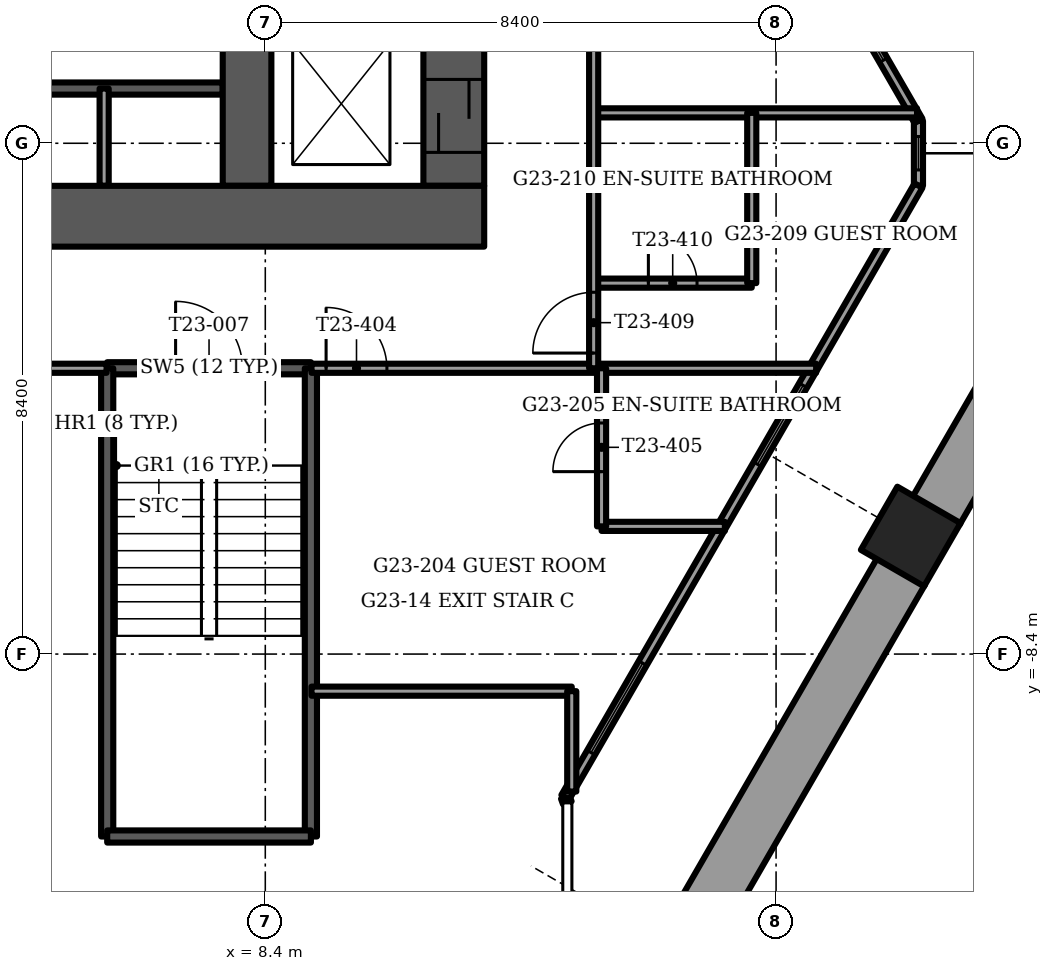
"""IFC4 building model, lengths in metres.
Left out: names, types, materials, properties, quantities, classifications, styles, units other than length and angle.
Written with IfcOpenShell. Run it as: python <this file> out.ifc"""

import sys

from ifc_helpers import new_model, si_unit, direction, frame, frame_2d, origin, origin_2d, place, context, subcontext, project, spatial, rectangle, extrude, element, fill, save


model = new_model("IFC4")
c1 = context("Model", 3, precision=1e-05, world=origin(), true_north=direction((0.0, 1.0)))
c2 = subcontext(c1, "Body", "Model", "MODEL_VIEW")
j1 = project(units=[si_unit("LENGTHUNIT", "METRE"), si_unit("PLANEANGLEUNIT", "RADIAN")], contexts=[c1])
p1 = place(None, origin())
s1 = spatial("IfcSite", under=j1, at=p1, CompositionType="ELEMENT")
p2 = place(p1, origin())
s2 = spatial("IfcBuilding", under=s1, at=p2, CompositionType="ELEMENT")
p3 = place(p2, frame((0.0, 0.0, 93.0)))
s3 = spatial("IfcBuildingStorey", under=s2, at=p3, CompositionType="ELEMENT", Elevation=93.0)
p4 = place(p3, frame((19.014, -6.467, -1.2), z_axis=(0.0, 0.0, 1.0), x_axis=(-0.5, -0.866025403784, 0.0)))
e1 = element("IfcColumn", 1, at=p4, inside=s3, PredefinedType="COLUMN", context=c2, shape_type="SweptSolid", body=[
    extrude(rectangle(XDim=1.2, YDim=1.2, at=origin_2d()), origin(), (0.0, 0.0, 1.0), 3.75),
])
p5 = place(p3, frame((-12.0, -1.2, -0.3), z_axis=(0.0, 0.0, 1.0), x_axis=(1.0, 0.0, 0.0)))
e2 = element("IfcWall", 2, at=p5, inside=s3, PredefinedType="SHEAR", context=c2, shape_type="SweptSolid", body=[
    extrude(rectangle(XDim=24.0, YDim=1.0, at=frame_2d((12.0, 0.0))), origin(), (0.0, 0.0, 1.0), 3.75),
])
p6 = place(p5, frame((11.2, 0.0, 0.0)))
e3 = element("IfcOpeningElement", 3, at=p6, cuts=e2, PredefinedType="OPENING", context=c2, shape_type="SweptSolid", body=[
    extrude(rectangle(XDim=1.6, YDim=2.1, at=frame_2d((0.8, 1.05))), frame((0.0, 0.5, 0.0), z_axis=(0.0, -1.0, 0.0), x_axis=(1.0, 0.0, 0.0)), (0.0, 0.0, 1.0), 1.0),
])
p7 = place(p3, frame((8.1, -0.7, -0.3), z_axis=(0.0, 0.0, 1.0), x_axis=(0.0, 1.0, 0.0)))
e4 = element("IfcWall", 4, at=p7, inside=s3, PredefinedType="SHEAR", context=c2, shape_type="SweptSolid", body=[
    extrude(rectangle(XDim=9.4, YDim=0.8, at=frame_2d((4.7, 0.0))), origin(), (0.0, 0.0, 1.0), 3.75),
])
p8 = place(p7, frame((7.95, 0.0, 0.0)))
e5 = element("IfcOpeningElement", 5, at=p8, cuts=e4, PredefinedType="OPENING", context=c2, shape_type="SweptSolid", body=[
    extrude(rectangle(XDim=1.1, YDim=2.1, at=frame_2d((0.55, 1.05))), frame((0.0, 0.4, 0.0), z_axis=(0.0, -1.0, 0.0), x_axis=(1.0, 0.0, 0.0)), (0.0, 0.0, 1.0), 0.8),
])
p9 = place(p3, frame((11.5, -0.7, -0.3), z_axis=(0.0, 0.0, 1.0), x_axis=(0.0, 1.0, 0.0)))
e6 = element("IfcWall", 6, at=p9, inside=s3, PredefinedType="SHEAR", context=c2, shape_type="SweptSolid", body=[
    extrude(rectangle(XDim=9.4, YDim=1.0, at=frame_2d((4.7, 0.0))), origin(), (0.0, 0.0, 1.0), 3.75),
])
p10 = place(p9, frame((8.15, 0.0, 0.0)))
e7 = element("IfcOpeningElement", 7, at=p10, cuts=e6, PredefinedType="OPENING", context=c2, shape_type="SweptSolid", body=[
    extrude(rectangle(XDim=1.1, YDim=2.1, at=frame_2d((0.55, 1.05))), frame((0.0, 0.5, 0.0), z_axis=(0.0, -1.0, 0.0), x_axis=(1.0, 0.0, 0.0)), (0.0, 0.0, 1.0), 1.0),
])
p11 = place(p9, frame((0.55, 0.0, 0.0)))
e8 = element("IfcOpeningElement", 8, at=p11, cuts=e6, PredefinedType="OPENING", context=c2, shape_type="SweptSolid", body=[
    extrude(rectangle(XDim=1.2, YDim=2.1, at=frame_2d((0.6, 1.05))), frame((0.0, 0.5, 0.0), z_axis=(0.0, -1.0, 0.0), x_axis=(1.0, 0.0, 0.0)), (0.0, 0.0, 1.0), 1.0),
])
p12 = place(p9, frame((3.0, 0.0, 0.0)))
e9 = element("IfcOpeningElement", 9, at=p12, cuts=e6, PredefinedType="OPENING", context=c2, shape_type="SweptSolid", body=[
    extrude(rectangle(XDim=1.2, YDim=2.1, at=frame_2d((0.6, 1.05))), frame((0.0, 0.5, 0.0), z_axis=(0.0, -1.0, 0.0), x_axis=(1.0, 0.0, 0.0)), (0.0, 0.0, 1.0), 1.0),
])
p13 = place(p3, frame((15.522, -12.815, 0.0), z_axis=(0.0, 0.0, 1.0), x_axis=(0.499999023957, 0.866025967302, 0.0)))
e10 = element("IfcWall", 10, at=p13, inside=s3, PredefinedType="PARAPET", context=c2, shape_type="SweptSolid", body=[
    extrude(rectangle(XDim=6.673, YDim=0.9, at=frame_2d((3.337, 0.0))), origin(), (0.0, 0.0, 1.0), 1.1),
])
p14 = place(p3, frame((19.429, -6.048, 0.0), z_axis=(0.0, 0.0, 1.0), x_axis=(0.500006801911, 0.866021476663, 0.0)))
e11 = element("IfcWall", 11, at=p14, inside=s3, PredefinedType="PARAPET", context=c2, shape_type="SweptSolid", body=[
    extrude(rectangle(XDim=6.144, YDim=0.9, at=frame_2d((3.072, 0.0))), origin(), (0.0, 0.0, 1.0), 1.1),
])
p15 = place(p3, frame((22.501, 0.4, 0.0), z_axis=(0.0, 0.0, 1.0), x_axis=(-0.500011789842, 0.866018596809, 0.0)))
e12 = element("IfcWall", 12, at=p15, inside=s3, PredefinedType="PARAPET", context=c2, shape_type="SweptSolid", body=[
    extrude(rectangle(XDim=6.427, YDim=0.9, at=frame_2d((3.214, 0.0))), origin(), (0.0, 0.0, 1.0), 1.1),
])
p16 = place(p3, frame((13.334, -10.755, 0.0), z_axis=(0.0, 0.0, 1.0), x_axis=(0.500002662854, 0.86602386638, 0.0)))
e13 = element("IfcWall", 13, at=p16, inside=s3, PredefinedType="SOLIDWALL", context=c2, shape_type="SweptSolid", body=[
    extrude(rectangle(XDim=11.615, YDim=0.15, at=frame_2d((5.807, 0.0))), origin(), (0.0, 0.0, 1.0), 3.45),
])
p17 = place(p16, frame((0.847, 0.0, 0.15)))
e14 = element("IfcOpeningElement", 14, at=p17, cuts=e13, PredefinedType="OPENING", context=c2, shape_type="SweptSolid", body=[
    extrude(rectangle(XDim=1.7, YDim=2.2, at=frame_2d((0.85, 1.1))), frame((0.0, 0.075, 0.0), z_axis=(0.0, -1.0, 0.0), x_axis=(1.0, 0.0, 0.0)), (0.0, 0.0, 1.0), 0.15),
])
p18 = place(p16, frame((6.322, 0.0, 0.15)))
e15 = element("IfcOpeningElement", 15, at=p18, cuts=e13, PredefinedType="OPENING", context=c2, shape_type="SweptSolid", body=[
    extrude(rectangle(XDim=1.5, YDim=2.2, at=frame_2d((0.75, 1.1))), frame((0.0, 0.075, 0.0), z_axis=(0.0, -1.0, 0.0), x_axis=(1.0, 0.0, 0.0)), (0.0, 0.0, 1.0), 0.15),
])
p19 = place(p3, frame((19.141, 0.369, 0.0), z_axis=(0.0, 0.0, 1.0), x_axis=(-0.500002662854, 0.86602386638, 0.0)))
e16 = element("IfcWall", 16, at=p19, inside=s3, PredefinedType="SOLIDWALL", context=c2, shape_type="SweptSolid", body=[
    extrude(rectangle(XDim=11.615, YDim=0.15, at=frame_2d((5.807, 0.0))), origin(), (0.0, 0.0, 1.0), 3.45),
])
p20 = place(p19, frame((1.151, 0.0, 0.15)))
e17 = element("IfcOpeningElement", 17, at=p20, cuts=e16, PredefinedType="OPENING", context=c2, shape_type="SweptSolid", body=[
    extrude(rectangle(XDim=1.7, YDim=2.2, at=frame_2d((0.85, 1.1))), frame((0.0, 0.075, 0.0), z_axis=(0.0, -1.0, 0.0), x_axis=(1.0, 0.0, 0.0)), (0.0, 0.0, 1.0), 0.15),
])
p21 = place(p19, frame((3.251, 0.0, 0.15)))
e18 = element("IfcOpeningElement", 18, at=p21, cuts=e16, PredefinedType="OPENING", context=c2, shape_type="SweptSolid", body=[
    extrude(rectangle(XDim=1.5, YDim=2.2, at=frame_2d((0.75, 1.1))), frame((0.0, 0.075, 0.0), z_axis=(0.0, -1.0, 0.0), x_axis=(1.0, 0.0, 0.0)), (0.0, 0.0, 1.0), 0.15),
])
p22 = place(p19, frame((5.351, 0.0, 0.15)))
e19 = element("IfcOpeningElement", 19, at=p22, cuts=e16, PredefinedType="OPENING", context=c2, shape_type="SweptSolid", body=[
    extrude(rectangle(XDim=1.7, YDim=2.2, at=frame_2d((0.85, 1.1))), frame((0.0, 0.075, 0.0), z_axis=(0.0, -1.0, 0.0), x_axis=(1.0, 0.0, 0.0)), (0.0, 0.0, 1.0), 0.15),
])
p23 = place(p19, frame((7.451, 0.0, 0.15)))
e20 = element("IfcOpeningElement", 20, at=p23, cuts=e16, PredefinedType="OPENING", context=c2, shape_type="SweptSolid", body=[
    extrude(rectangle(XDim=1.5, YDim=2.2, at=frame_2d((0.75, 1.1))), frame((0.0, 0.075, 0.0), z_axis=(0.0, -1.0, 0.0), x_axis=(1.0, 0.0, 0.0)), (0.0, 0.0, 1.0), 0.15),
])
p24 = place(p3, frame((19.141, -0.696, 0.0), z_axis=(0.0, 0.0, 1.0), x_axis=(0.0, 1.0, 0.0)))
e21 = element("IfcWall", 21, at=p24, inside=s3, PredefinedType="SOLIDWALL", context=c2, shape_type="SweptSolid", body=[
    extrude(rectangle(XDim=1.065, YDim=0.15, at=frame_2d((0.533, 0.0))), origin(), (0.0, 0.0, 1.0), 3.45),
])
p25 = place(p24, frame((0.258, 0.0, 0.15)))
e22 = element("IfcOpeningElement", 22, at=p25, cuts=e21, PredefinedType="OPENING", context=c2, shape_type="SweptSolid", body=[
    extrude(rectangle(XDim=0.55, YDim=2.2, at=frame_2d((0.275, 1.1))), frame((0.0, 0.075, 0.0), z_axis=(0.0, -1.0, 0.0), x_axis=(1.0, 0.0, 0.0)), (0.0, 0.0, 1.0), 0.15),
])
p26 = place(p3, frame((13.334, -10.755, 0.0), z_axis=(0.0, 0.0, 1.0), x_axis=(0.337751931921, -0.941235163221, 0.0)))
e23 = element("IfcWall", 23, at=p26, inside=s3, PredefinedType="SOLIDWALL", context=c2, shape_type="SweptSolid", body=[
    extrude(rectangle(XDim=0.098, YDim=0.15, at=frame_2d((0.049, 0.0))), origin(), (0.0, 0.0, 1.0), 3.45),
])
p27 = place(p3, frame((4.45, 0.9, -0.3), z_axis=(0.0, 0.0, 1.0), x_axis=(1.0, 0.0, 0.0)))
e24 = element("IfcWall", 24, at=p27, inside=s3, PredefinedType="SOLIDWALL", context=c2, shape_type="SweptSolid", body=[
    extrude(rectangle(XDim=3.25, YDim=0.2, at=frame_2d((1.625, 0.0))), origin(), (0.0, 0.0, 1.0), 3.75),
])
p28 = place(p3, frame((5.75, -0.7, 0.0), z_axis=(0.0, 0.0, 1.0), x_axis=(0.0, 1.0, 0.0)))
e25 = element("IfcWall", 25, at=p28, inside=s3, PredefinedType="PARTITIONING", context=c2, shape_type="SweptSolid", body=[
    extrude(rectangle(XDim=1.6, YDim=0.15, at=frame_2d((0.8, 0.0))), origin(), (0.0, 0.0, 1.0), 3.45),
])
p29 = place(p3, frame((5.8, -3.7, -0.3), z_axis=(0.0, 0.0, 1.0), x_axis=(1.0, 0.0, 0.0)))
e26 = element("IfcWall", 26, at=p29, inside=s3, PredefinedType="SOLIDWALL", context=c2, shape_type="SweptSolid", body=[
    extrude(rectangle(XDim=3.35, YDim=0.2, at=frame_2d((1.675, 0.0))), origin(), (0.0, 0.0, 1.0), 3.75),
])
p30 = place(p29, frame((1.125, 0.0, 0.0)))
e27 = element("IfcOpeningElement", 27, at=p30, cuts=e26, PredefinedType="OPENING", context=c2, shape_type="SweptSolid", body=[
    extrude(rectangle(XDim=1.1, YDim=2.1, at=frame_2d((0.55, 1.05))), frame((0.0, 0.1, 0.0), z_axis=(0.0, -1.0, 0.0), x_axis=(1.0, 0.0, 0.0)), (0.0, 0.0, 1.0), 0.2),
])
for number, where, z_axis, x_axis in (
    (28, (5.8, -3.7, -0.3), (0.0, 0.0, 1.0), (0.0, -1.0, 0.0)),
    (29, (9.15, -3.7, -0.3), (0.0, 0.0, 1.0), (0.0, -1.0, 0.0)),
):
    element("IfcWall", number, at=place(p3, frame(where, z_axis=z_axis, x_axis=x_axis)), inside=s3, PredefinedType="SOLIDWALL", context=c2, shape_type="SweptSolid", body=[
        extrude(rectangle(XDim=7.7, YDim=0.2, at=frame_2d((3.85, 0.0))), origin(), (0.0, 0.0, 1.0), 3.75),
    ])
p31 = place(p3, frame((5.8, -11.4, -0.3), z_axis=(0.0, 0.0, 1.0), x_axis=(1.0, 0.0, 0.0)))
e30 = element("IfcWall", 30, at=p31, inside=s3, PredefinedType="SOLIDWALL", context=c2, shape_type="SweptSolid", body=[
    extrude(rectangle(XDim=3.35, YDim=0.2, at=frame_2d((1.675, 0.0))), origin(), (0.0, 0.0, 1.0), 3.75),
])
p32 = place(p3, frame((9.16, -9.01, 0.0), z_axis=(0.0, 0.0, 1.0), x_axis=(1.0, 0.0, 0.0)))
e31 = element("IfcWall", 31, at=p32, inside=s3, PredefinedType="PARTITIONING", context=c2, shape_type="SweptSolid", body=[
    extrude(rectangle(XDim=4.28, YDim=0.15, at=frame_2d((2.14, 0.0))), origin(), (0.0, 0.0, 1.0), 3.45),
])
p33 = place(p3, frame((13.93, -6.3, 0.0), z_axis=(0.0, 0.0, 1.0), x_axis=(1.0, 0.0, 0.0)))
e32 = element("IfcWall", 32, at=p33, inside=s3, PredefinedType="PARTITIONING", context=c2, shape_type="SweptSolid", body=[
    extrude(rectangle(XDim=2.028, YDim=0.15, at=frame_2d((1.014, 0.0))), origin(), (0.0, 0.0, 1.0), 3.45),
])
p34 = place(p3, frame((4.075, -3.7, 0.0), z_axis=(0.0, 0.0, 1.0), x_axis=(1.0, 0.0, 0.0)))
e33 = element("IfcWall", 33, at=p34, inside=s3, PredefinedType="PARTITIONING", context=c2, shape_type="SweptSolid", body=[
    extrude(rectangle(XDim=1.715, YDim=0.15, at=frame_2d((0.857, 0.0))), origin(), (0.0, 0.0, 1.0), 3.45),
])
p35 = place(p3, frame((9.16, -3.7, 0.0), z_axis=(0.0, 0.0, 1.0), x_axis=(1.0, 0.0, 0.0)))
e34 = element("IfcWall", 34, at=p35, inside=s3, PredefinedType="PARTITIONING", context=c2, shape_type="SweptSolid", body=[
    extrude(rectangle(XDim=8.299, YDim=0.15, at=frame_2d((4.149, 0.0))), origin(), (0.0, 0.0, 1.0), 3.45),
])
p36 = place(p35, frame((0.24, 0.0, 0.0)))
e35 = element("IfcOpeningElement", 35, at=p36, cuts=e34, PredefinedType="OPENING", context=c2, shape_type="SweptSolid", body=[
    extrude(rectangle(XDim=1.0, YDim=2.1, at=frame_2d((0.5, 1.05))), frame((0.0, 0.075, 0.0), z_axis=(0.0, -1.0, 0.0), x_axis=(1.0, 0.0, 0.0)), (0.0, 0.0, 1.0), 0.15),
])
p37 = place(p3, frame((13.8, -2.3, 0.0), z_axis=(0.0, 0.0, 1.0), x_axis=(1.0, 0.0, 0.0)))
e36 = element("IfcWall", 36, at=p37, inside=s3, PredefinedType="PARTITIONING", context=c2, shape_type="SweptSolid", body=[
    extrude(rectangle(XDim=2.6, YDim=0.15, at=frame_2d((1.3, 0.0))), origin(), (0.0, 0.0, 1.0), 3.45),
])
p38 = place(p37, frame((0.9, 0.0, 0.0)))
e37 = element("IfcOpeningElement", 37, at=p38, cuts=e36, PredefinedType="OPENING", context=c2, shape_type="SweptSolid", body=[
    extrude(rectangle(XDim=0.8, YDim=2.1, at=frame_2d((0.4, 1.05))), frame((0.0, 0.075, 0.0), z_axis=(0.0, -1.0, 0.0), x_axis=(1.0, 0.0, 0.0)), (0.0, 0.0, 1.0), 0.15),
])
p39 = place(p3, frame((13.8, 0.5, 0.0), z_axis=(0.0, 0.0, 1.0), x_axis=(1.0, 0.0, 0.0)))
e38 = element("IfcWall", 38, at=p39, inside=s3, PredefinedType="PARTITIONING", context=c2, shape_type="SweptSolid", body=[
    extrude(rectangle(XDim=5.318, YDim=0.15, at=frame_2d((2.659, 0.0))), origin(), (0.0, 0.0, 1.0), 3.45),
])
p40 = place(p3, frame((16.4, -2.3, 0.0), z_axis=(0.0, 0.0, 1.0), x_axis=(0.0, 1.0, 0.0)))
e39 = element("IfcWall", 39, at=p40, inside=s3, PredefinedType="PARTITIONING", context=c2, shape_type="SweptSolid", body=[
    extrude(rectangle(XDim=2.8, YDim=0.15, at=frame_2d((1.4, 0.0))), origin(), (0.0, 0.0, 1.0), 3.45),
])
p41 = place(p3, frame((13.93, -6.3, 0.0), z_axis=(0.0, 0.0, 1.0), x_axis=(0.0, 1.0, 0.0)))
e40 = element("IfcWall", 40, at=p41, inside=s3, PredefinedType="PARTITIONING", context=c2, shape_type="SweptSolid", body=[
    extrude(rectangle(XDim=2.6, YDim=0.15, at=frame_2d((1.3, 0.0))), origin(), (0.0, 0.0, 1.0), 3.45),
])
p42 = place(p41, frame((0.9, 0.0, 0.0)))
e41 = element("IfcOpeningElement", 41, at=p42, cuts=e40, PredefinedType="OPENING", context=c2, shape_type="SweptSolid", body=[
    extrude(rectangle(XDim=0.8, YDim=2.1, at=frame_2d((0.4, 1.05))), frame((0.0, 0.075, 0.0), z_axis=(0.0, -1.0, 0.0), x_axis=(1.0, 0.0, 0.0)), (0.0, 0.0, 1.0), 0.15),
])
p43 = place(p3, frame((13.8, -3.7, 0.0), z_axis=(0.0, 0.0, 1.0), x_axis=(0.0, 1.0, 0.0)))
e42 = element("IfcWall", 42, at=p43, inside=s3, PredefinedType="PARTITIONING", context=c2, shape_type="SweptSolid", body=[
    extrude(rectangle(XDim=13.41, YDim=0.15, at=frame_2d((6.705, 0.0))), origin(), (0.0, 0.0, 1.0), 3.45),
])
p44 = place(p43, frame((0.25, 0.0, 0.0)))
e43 = element("IfcOpeningElement", 43, at=p44, cuts=e42, PredefinedType="OPENING", context=c2, shape_type="SweptSolid", body=[
    extrude(rectangle(XDim=1.0, YDim=2.1, at=frame_2d((0.5, 1.05))), frame((0.0, 0.075, 0.0), z_axis=(0.0, -1.0, 0.0), x_axis=(1.0, 0.0, 0.0)), (0.0, 0.0, 1.0), 0.15),
])
p45 = place(p43, frame((8.183, 0.0, 0.0)))
e44 = element("IfcOpeningElement", 44, at=p45, cuts=e42, PredefinedType="OPENING", context=c2, shape_type="SweptSolid", body=[
    extrude(rectangle(XDim=1.0, YDim=2.1, at=frame_2d((0.5, 1.05))), frame((0.0, 0.075, 0.0), z_axis=(0.0, -1.0, 0.0), x_axis=(1.0, 0.0, 0.0)), (0.0, 0.0, 1.0), 0.15),
])
p46 = place(p3, frame((13.44, -10.661, 0.0), z_axis=(0.0, 0.0, 1.0), x_axis=(0.0, 1.0, 0.0)))
e45 = element("IfcWall", 45, at=p46, inside=s3, PredefinedType="PARTITIONING", context=c2, shape_type="SweptSolid", body=[
    extrude(rectangle(XDim=1.651, YDim=0.15, at=frame_2d((0.825, 0.0))), origin(), (0.0, 0.0, 1.0), 3.45),
])
p47 = place(p17, origin())
e46 = element("IfcWindow", 46, at=p47, inside=s3, PartitioningType="SINGLE_PANEL", PredefinedType="WINDOW", context=c2, shape_type="SweptSolid", body=[
    extrude(rectangle(XDim=1.7, YDim=2.2, at=frame_2d((0.85, 1.1))), frame((0.0, 0.03, 0.0), z_axis=(0.0, -1.0, 0.0), x_axis=(1.0, 0.0, 0.0)), (0.0, 0.0, 1.0), 0.06),
])
fill(e14, e46)
p48 = place(p18, origin())
e47 = element("IfcWindow", 47, at=p48, inside=s3, PartitioningType="SINGLE_PANEL", PredefinedType="WINDOW", context=c2, shape_type="SweptSolid", body=[
    extrude(rectangle(XDim=1.5, YDim=2.2, at=frame_2d((0.75, 1.1))), frame((0.0, 0.03, 0.0), z_axis=(0.0, -1.0, 0.0), x_axis=(1.0, 0.0, 0.0)), (0.0, 0.0, 1.0), 0.06),
])
fill(e15, e47)
p49 = place(p20, origin())
e48 = element("IfcWindow", 48, at=p49, inside=s3, PartitioningType="SINGLE_PANEL", PredefinedType="WINDOW", context=c2, shape_type="SweptSolid", body=[
    extrude(rectangle(XDim=1.7, YDim=2.2, at=frame_2d((0.85, 1.1))), frame((0.0, 0.03, 0.0), z_axis=(0.0, -1.0, 0.0), x_axis=(1.0, 0.0, 0.0)), (0.0, 0.0, 1.0), 0.06),
])
fill(e17, e48)
p50 = place(p25, origin())
e49 = element("IfcWindow", 49, at=p50, inside=s3, PartitioningType="SINGLE_PANEL", PredefinedType="WINDOW", context=c2, shape_type="SweptSolid", body=[
    extrude(rectangle(XDim=0.55, YDim=2.2, at=frame_2d((0.275, 1.1))), frame((0.0, 0.03, 0.0), z_axis=(0.0, -1.0, 0.0), x_axis=(1.0, 0.0, 0.0)), (0.0, 0.0, 1.0), 0.06),
])
fill(e22, e49)
p51 = place(p30, origin())
e50 = element("IfcDoor", 50, at=p51, inside=s3, OperationType="SINGLE_SWING_LEFT", PredefinedType="DOOR", context=c2, shape_type="SweptSolid", body=[
    extrude(rectangle(XDim=1.1, YDim=2.1, at=frame_2d((0.55, 1.05))), frame((0.0, 0.025, 0.0), z_axis=(0.0, -1.0, 0.0), x_axis=(1.0, 0.0, 0.0)), (0.0, 0.0, 1.0), 0.05),
])
fill(e27, e50)
p52 = place(p11, origin())
e51 = element("IfcDoor", 51, at=p52, inside=s3, OperationType="SLIDING_TO_LEFT", PredefinedType="DOOR", context=c2, shape_type="SweptSolid", body=[
    extrude(rectangle(XDim=1.2, YDim=2.1, at=frame_2d((0.6, 1.05))), frame((0.0, 0.025, 0.0), z_axis=(0.0, -1.0, 0.0), x_axis=(1.0, 0.0, 0.0)), (0.0, 0.0, 1.0), 0.05),
])
fill(e8, e51)
p53 = place(p36, origin())
e52 = element("IfcDoor", 52, at=p53, inside=s3, OperationType="SINGLE_SWING_LEFT", PredefinedType="DOOR", context=c2, shape_type="SweptSolid", body=[
    extrude(rectangle(XDim=1.0, YDim=2.1, at=frame_2d((0.5, 1.05))), frame((0.0, 0.025, 0.0), z_axis=(0.0, -1.0, 0.0), x_axis=(1.0, 0.0, 0.0)), (0.0, 0.0, 1.0), 0.05),
])
fill(e35, e52)
p54 = place(p42, origin())
e53 = element("IfcDoor", 53, at=p54, inside=s3, OperationType="SINGLE_SWING_RIGHT", PredefinedType="DOOR", context=c2, shape_type="SweptSolid", body=[
    extrude(rectangle(XDim=0.8, YDim=2.1, at=frame_2d((0.4, 1.05))), frame((0.0, 0.025, 0.0), z_axis=(0.0, -1.0, 0.0), x_axis=(1.0, 0.0, 0.0)), (0.0, 0.0, 1.0), 0.05),
])
fill(e41, e53)
p55 = place(p44, origin())
e54 = element("IfcDoor", 54, at=p55, inside=s3, OperationType="SINGLE_SWING_LEFT", PredefinedType="DOOR", context=c2, shape_type="SweptSolid", body=[
    extrude(rectangle(XDim=1.0, YDim=2.1, at=frame_2d((0.5, 1.05))), frame((0.0, 0.025, 0.0), z_axis=(0.0, -1.0, 0.0), x_axis=(1.0, 0.0, 0.0)), (0.0, 0.0, 1.0), 0.05),
])
fill(e43, e54)
p56 = place(p38, origin())
e55 = element("IfcDoor", 55, at=p56, inside=s3, OperationType="SINGLE_SWING_LEFT", PredefinedType="DOOR", context=c2, shape_type="SweptSolid", body=[
    extrude(rectangle(XDim=0.8, YDim=2.1, at=frame_2d((0.4, 1.05))), frame((0.0, 0.025, 0.0), z_axis=(0.0, -1.0, 0.0), x_axis=(1.0, 0.0, 0.0)), (0.0, 0.0, 1.0), 0.05),
])
fill(e37, e55)
save(model, sys.argv[1])
